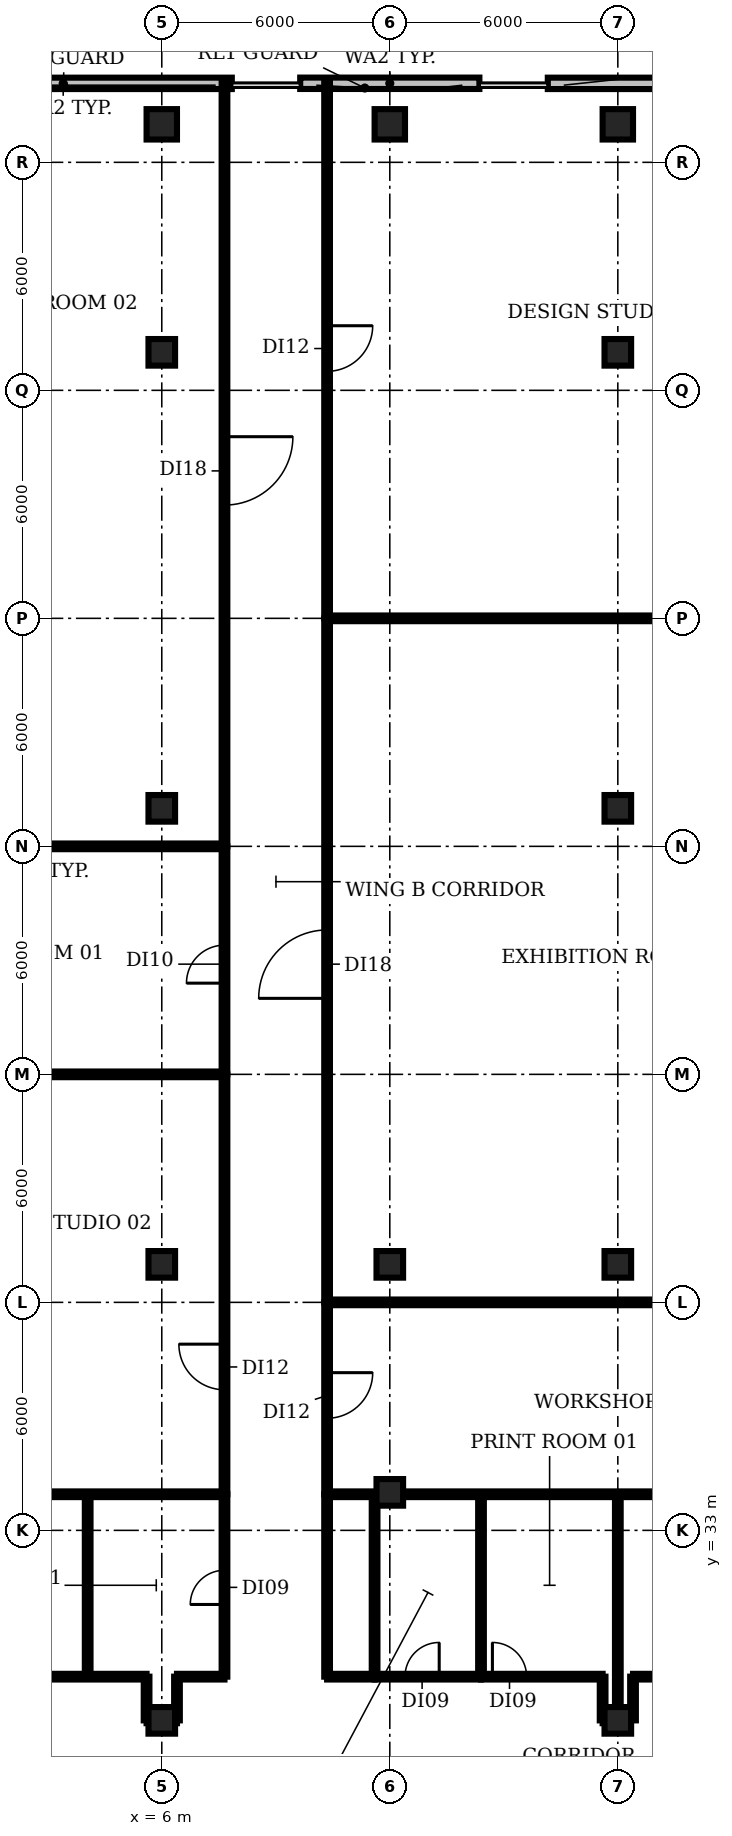
"""IFC4 building model, lengths in metres.
Left out: names, types, materials, properties, quantities, classifications, styles, units other than length and angle.
Written with IfcOpenShell. Run it as: python <this file> out.ifc"""

import sys

from ifc_helpers import new_model, si_unit, direction, frame, frame_2d, origin, origin_2d, place, context, subcontext, project, spatial, rectangle, extrude, element, fill, save


model = new_model("IFC4")
c1 = context("Model", 3, precision=1e-05, world=origin(), true_north=direction((0.0, 1.0)))
c2 = subcontext(c1, "Body", "Model", "MODEL_VIEW")
j1 = project(units=[si_unit("LENGTHUNIT", "METRE"), si_unit("PLANEANGLEUNIT", "RADIAN")], contexts=[c1])
p1 = place(None, origin())
s1 = spatial("IfcSite", under=j1, at=p1, CompositionType="ELEMENT")
p2 = place(p1, origin())
s2 = spatial("IfcBuilding", under=s1, at=p2, CompositionType="ELEMENT")
p3 = place(p2, frame((0.0, 0.0, 209.6)))
s3 = spatial("IfcBuildingStorey", under=s2, at=p3, CompositionType="ELEMENT", Elevation=209.6)
for number, where, z_axis, x_axis in (
    (1, (6.0, 28.0, 0.0), (0.0, 0.0, 1.0), (1.0, 0.0, 0.0)),
    (2, (6.0, 40.0, 0.0), (0.0, 0.0, 1.0), (1.0, 0.0, 0.0)),
    (3, (6.0, 52.0, 0.0), (0.0, 0.0, 1.0), (1.0, 0.0, 0.0)),
    (4, (6.0, 64.0, 0.0), (0.0, 0.0, 1.0), (1.0, 0.0, 0.0)),
):
    element("IfcColumn", number, at=place(p3, frame(where, z_axis=z_axis, x_axis=x_axis)), inside=s3, PredefinedType="COLUMN", context=c2, shape_type="SweptSolid", body=[
        extrude(rectangle(XDim=0.7, YDim=0.7, at=origin_2d()), origin(), (0.0, 0.0, 1.0), 3.8),
    ])
p4 = place(p3, frame((6.0, 70.0, 0.0), z_axis=(0.0, 0.0, 1.0), x_axis=(1.0, 0.0, 0.0)))
e5 = element("IfcColumn", 5, at=p4, inside=s3, PredefinedType="COLUMN", context=c2, shape_type="SweptSolid", body=[
    extrude(rectangle(XDim=0.8, YDim=0.8, at=origin_2d()), origin(), (0.0, 0.0, 1.0), 3.8),
])
for number, where, z_axis, x_axis in (
    (6, (12.0, 34.0, 0.0), (0.0, 0.0, 1.0), (1.0, 0.0, 0.0)),
    (7, (12.0, 40.0, 0.0), (0.0, 0.0, 1.0), (1.0, 0.0, 0.0)),
):
    element("IfcColumn", number, at=place(p3, frame(where, z_axis=z_axis, x_axis=x_axis)), inside=s3, PredefinedType="COLUMN", context=c2, shape_type="SweptSolid", body=[
        extrude(rectangle(XDim=0.7, YDim=0.7, at=origin_2d()), origin(), (0.0, 0.0, 1.0), 3.8),
    ])
p5 = place(p3, frame((12.0, 70.0, 0.0), z_axis=(0.0, 0.0, 1.0), x_axis=(1.0, 0.0, 0.0)))
e8 = element("IfcColumn", 8, at=p5, inside=s3, PredefinedType="COLUMN", context=c2, shape_type="SweptSolid", body=[
    extrude(rectangle(XDim=0.8, YDim=0.8, at=origin_2d()), origin(), (0.0, 0.0, 1.0), 3.8),
])
for number, where, z_axis, x_axis in (
    (9, (18.0, 28.0, 0.0), (0.0, 0.0, 1.0), (1.0, 0.0, 0.0)),
    (10, (18.0, 40.0, 0.0), (0.0, 0.0, 1.0), (1.0, 0.0, 0.0)),
    (11, (18.0, 52.0, 0.0), (0.0, 0.0, 1.0), (1.0, 0.0, 0.0)),
    (12, (18.0, 64.0, 0.0), (0.0, 0.0, 1.0), (1.0, 0.0, 0.0)),
):
    element("IfcColumn", number, at=place(p3, frame(where, z_axis=z_axis, x_axis=x_axis)), inside=s3, PredefinedType="COLUMN", context=c2, shape_type="SweptSolid", body=[
        extrude(rectangle(XDim=0.7, YDim=0.7, at=origin_2d()), origin(), (0.0, 0.0, 1.0), 3.8),
    ])
p6 = place(p3, frame((18.0, 70.0, 0.0), z_axis=(0.0, 0.0, 1.0), x_axis=(1.0, 0.0, 0.0)))
e13 = element("IfcColumn", 13, at=p6, inside=s3, PredefinedType="COLUMN", context=c2, shape_type="SweptSolid", body=[
    extrude(rectangle(XDim=0.8, YDim=0.8, at=origin_2d()), origin(), (0.0, 0.0, 1.0), 3.8),
])
p7 = place(p3, frame((25.03, 71.078, 0.0), z_axis=(0.0, 0.0, 1.0), x_axis=(-1.0, 0.0, 0.0)))
e14 = element("IfcWall", 14, at=p7, inside=s3, PredefinedType="SOLIDWALL", context=c2, shape_type="SweptSolid", body=[
    extrude(rectangle(XDim=8.873, YDim=0.3, at=frame_2d((4.436, 0.0))), origin(), (0.0, 0.0, 1.0), 3.8),
])
p8 = place(p3, frame((14.357, 71.08, 0.0), z_axis=(0.0, 0.0, 1.0), x_axis=(-1.0, 0.0, 0.0)))
e15 = element("IfcWall", 15, at=p8, inside=s3, PredefinedType="SOLIDWALL", context=c2, shape_type="SweptSolid", body=[
    extrude(rectangle(XDim=4.715, YDim=0.3, at=frame_2d((2.357, 0.0))), origin(), (0.0, 0.0, 1.0), 3.8),
])
p9 = place(p3, frame((7.843, 71.078, 0.0), z_axis=(0.0, 0.0, 1.0), x_axis=(-1.0, 0.0, 0.0)))
e16 = element("IfcWall", 16, at=p9, inside=s3, PredefinedType="SOLIDWALL", context=c2, shape_type="SweptSolid", body=[
    extrude(rectangle(XDim=8.873, YDim=0.3, at=frame_2d((4.436, 0.0))), origin(), (0.0, 0.0, 1.0), 3.8),
])
p10 = place(p3, frame((-2.18, 51.0, 0.0), z_axis=(0.0, 0.0, 1.0), x_axis=(1.0, 0.0, 0.0)))
e17 = element("IfcWall", 17, at=p10, inside=s3, PredefinedType="PARTITIONING", context=c2, shape_type="SweptSolid", body=[
    extrude(rectangle(XDim=9.83, YDim=0.15, at=frame_2d((4.915, 0.0))), origin(), (0.0, 0.0, 1.0), 2.83),
])
p11 = place(p3, frame((-1.7, 45.0, 0.0), z_axis=(0.0, 0.0, 1.0), x_axis=(1.0, 0.0, 0.0)))
e18 = element("IfcWall", 18, at=p11, inside=s3, PredefinedType="PARTITIONING", context=c2, shape_type="SweptSolid", body=[
    extrude(rectangle(XDim=9.35, YDim=0.15, at=frame_2d((4.675, 0.0))), origin(), (0.0, 0.0, 1.0), 2.83),
])
p12 = place(p3, frame((-0.98, 33.95, 0.0), z_axis=(0.0, 0.0, 1.0), x_axis=(1.0, 0.0, 0.0)))
e19 = element("IfcWall", 19, at=p12, inside=s3, PredefinedType="PARTITIONING", context=c2, shape_type="SweptSolid", body=[
    extrude(rectangle(XDim=8.63, YDim=0.15, at=frame_2d((4.315, 0.0))), origin(), (0.0, 0.0, 1.0), 2.83),
])
p13 = place(p3, frame((2.85, 29.15, 0.0), z_axis=(0.0, 0.0, 1.0), x_axis=(1.0, 0.0, 0.0)))
e20 = element("IfcWall", 20, at=p13, inside=s3, PredefinedType="PARTITIONING", context=c2, shape_type="SweptSolid", body=[
    extrude(rectangle(XDim=2.75, YDim=0.15, at=frame_2d((1.375, 0.0))), origin(), (0.0, 0.0, 1.0), 2.83),
])
p14 = place(p3, frame((4.05, 29.15, 0.0), z_axis=(0.0, 0.0, 1.0), x_axis=(0.0, 1.0, 0.0)))
e21 = element("IfcWall", 21, at=p14, inside=s3, PredefinedType="PARTITIONING", context=c2, shape_type="SweptSolid", body=[
    extrude(rectangle(XDim=4.8, YDim=0.15, at=frame_2d((2.4, 0.0))), origin(), (0.0, 0.0, 1.0), 2.83),
])
p15 = place(p3, frame((5.6, 28.0, 0.0), z_axis=(0.0, 0.0, 1.0), x_axis=(0.0, 1.0, 0.0)))
e22 = element("IfcWall", 22, at=p15, inside=s3, PredefinedType="PARTITIONING", context=c2, shape_type="SweptSolid", body=[
    extrude(rectangle(XDim=1.15, YDim=0.15, at=frame_2d((0.575, 0.0))), origin(), (0.0, 0.0, 1.0), 2.83),
])
p16 = place(p3, frame((5.6, 28.0, 0.0), z_axis=(0.0, 0.0, 1.0), x_axis=(1.0, 0.0, 0.0)))
e23 = element("IfcWall", 23, at=p16, inside=s3, PredefinedType="PARTITIONING", context=c2, shape_type="SweptSolid", body=[
    extrude(rectangle(XDim=0.8, YDim=0.15, at=frame_2d((0.4, 0.0))), origin(), (0.0, 0.0, 1.0), 2.83),
])
p17 = place(p3, frame((6.4, 28.0, 0.0), z_axis=(0.0, 0.0, 1.0), x_axis=(0.0, 1.0, 0.0)))
e24 = element("IfcWall", 24, at=p17, inside=s3, PredefinedType="PARTITIONING", context=c2, shape_type="SweptSolid", body=[
    extrude(rectangle(XDim=1.15, YDim=0.15, at=frame_2d((0.575, 0.0))), origin(), (0.0, 0.0, 1.0), 2.83),
])
p18 = place(p3, frame((6.4, 29.15, 0.0), z_axis=(0.0, 0.0, 1.0), x_axis=(1.0, 0.0, 0.0)))
e25 = element("IfcWall", 25, at=p18, inside=s3, PredefinedType="PARTITIONING", context=c2, shape_type="SweptSolid", body=[
    extrude(rectangle(XDim=1.25, YDim=0.15, at=frame_2d((0.625, 0.0))), origin(), (0.0, 0.0, 1.0), 2.83),
])
p19 = place(p3, frame((7.65, 29.15, 0.0), z_axis=(0.0, 0.0, 1.0), x_axis=(0.0, 1.0, 0.0)))
e26 = element("IfcWall", 26, at=p19, inside=s3, PredefinedType="PARTITIONING", context=c2, shape_type="SweptSolid", body=[
    extrude(rectangle(XDim=4.8, YDim=0.15, at=frame_2d((2.4, 0.0))), origin(), (0.0, 0.0, 1.0), 2.83),
])
p20 = place(p19, frame((1.9, 0.0, 0.0)))
e27 = element("IfcOpeningElement", 27, at=p20, cuts=e26, PredefinedType="OPENING", context=c2, shape_type="SweptSolid", body=[
    extrude(rectangle(XDim=0.9, YDim=2.1, at=frame_2d((0.45, 1.05))), frame((0.0, 0.085, 0.0), z_axis=(0.0, -1.0, 0.0), x_axis=(1.0, 0.0, 0.0)), (0.0, 0.0, 1.0), 0.17),
])
p21 = place(p3, frame((7.65, 33.95, 0.0), z_axis=(0.0, 0.0, 1.0), x_axis=(0.0, 1.0, 0.0)))
e28 = element("IfcWall", 28, at=p21, inside=s3, PredefinedType="PARTITIONING", context=c2, shape_type="SweptSolid", body=[
    extrude(rectangle(XDim=11.05, YDim=0.15, at=frame_2d((5.525, 0.0))), origin(), (0.0, 0.0, 1.0), 2.83),
])
p22 = place(p21, frame((2.75, 0.0, 0.0)))
e29 = element("IfcOpeningElement", 29, at=p22, cuts=e28, PredefinedType="OPENING", context=c2, shape_type="SweptSolid", body=[
    extrude(rectangle(XDim=1.2, YDim=2.1, at=frame_2d((0.6, 1.05))), frame((0.0, 0.085, 0.0), z_axis=(0.0, -1.0, 0.0), x_axis=(1.0, 0.0, 0.0)), (0.0, 0.0, 1.0), 0.17),
])
p23 = place(p3, frame((7.65, 45.0, 0.0), z_axis=(0.0, 0.0, 1.0), x_axis=(0.0, 1.0, 0.0)))
e30 = element("IfcWall", 30, at=p23, inside=s3, PredefinedType="PARTITIONING", context=c2, shape_type="SweptSolid", body=[
    extrude(rectangle(XDim=6.0, YDim=0.15, at=frame_2d((3.0, 0.0))), origin(), (0.0, 0.0, 1.0), 2.83),
])
p24 = place(p23, frame((2.4, 0.0, 0.0)))
e31 = element("IfcOpeningElement", 31, at=p24, cuts=e30, PredefinedType="OPENING", context=c2, shape_type="SweptSolid", body=[
    extrude(rectangle(XDim=1.0, YDim=2.1, at=frame_2d((0.5, 1.05))), frame((0.0, 0.085, 0.0), z_axis=(0.0, -1.0, 0.0), x_axis=(1.0, 0.0, 0.0)), (0.0, 0.0, 1.0), 0.17),
])
p25 = place(p3, frame((7.65, 71.09, 0.0), z_axis=(0.0, 0.0, 1.0), x_axis=(0.0, -1.0, 0.0)))
e32 = element("IfcWall", 32, at=p25, inside=s3, PredefinedType="PARTITIONING", context=c2, shape_type="SweptSolid", body=[
    extrude(rectangle(XDim=20.09, YDim=0.15, at=frame_2d((10.045, 0.0))), origin(), (0.0, 0.0, 1.0), 2.83),
])
p26 = place(p25, frame((9.31, 0.0, 0.0)))
e33 = element("IfcOpeningElement", 33, at=p26, cuts=e32, PredefinedType="OPENING", context=c2, shape_type="SweptSolid", body=[
    extrude(rectangle(XDim=1.8, YDim=2.1, at=frame_2d((0.9, 1.05))), frame((0.0, 0.085, 0.0), z_axis=(0.0, -1.0, 0.0), x_axis=(1.0, 0.0, 0.0)), (0.0, 0.0, 1.0), 0.17),
])
p27 = place(p3, frame((10.35, 29.15, 0.0), z_axis=(0.0, 0.0, 1.0), x_axis=(0.0, 1.0, 0.0)))
e34 = element("IfcWall", 34, at=p27, inside=s3, PredefinedType="PARTITIONING", context=c2, shape_type="SweptSolid", body=[
    extrude(rectangle(XDim=4.8, YDim=0.15, at=frame_2d((2.4, 0.0))), origin(), (0.0, 0.0, 1.0), 2.83),
])
p28 = place(p3, frame((10.35, 29.15, 0.0), z_axis=(0.0, 0.0, 1.0), x_axis=(1.0, 0.0, 0.0)))
e35 = element("IfcWall", 35, at=p28, inside=s3, PredefinedType="PARTITIONING", context=c2, shape_type="SweptSolid", body=[
    extrude(rectangle(XDim=1.25, YDim=0.15, at=frame_2d((0.625, 0.0))), origin(), (0.0, 0.0, 1.0), 2.83),
])
p29 = place(p3, frame((10.35, 33.95, 0.0), z_axis=(0.0, 0.0, 1.0), x_axis=(1.0, 0.0, 0.0)))
e36 = element("IfcWall", 36, at=p29, inside=s3, PredefinedType="PARTITIONING", context=c2, shape_type="SweptSolid", body=[
    extrude(rectangle(XDim=1.242, YDim=0.15, at=frame_2d((0.621, 0.0))), origin(), (0.0, 0.0, 1.0), 2.83),
])
p30 = place(p3, frame((10.35, 39.0, 0.0), z_axis=(0.0, 0.0, 1.0), x_axis=(0.0, -1.0, 0.0)))
e37 = element("IfcWall", 37, at=p30, inside=s3, PredefinedType="PARTITIONING", context=c2, shape_type="SweptSolid", body=[
    extrude(rectangle(XDim=5.05, YDim=0.15, at=frame_2d((2.525, 0.0))), origin(), (0.0, 0.0, 1.0), 2.83),
])
p31 = place(p30, frame((1.85, 0.0, 0.0)))
e38 = element("IfcOpeningElement", 38, at=p31, cuts=e37, PredefinedType="OPENING", context=c2, shape_type="SweptSolid", body=[
    extrude(rectangle(XDim=1.2, YDim=2.1, at=frame_2d((0.6, 1.05))), frame((0.0, 0.085, 0.0), z_axis=(0.0, -1.0, 0.0), x_axis=(1.0, 0.0, 0.0)), (0.0, 0.0, 1.0), 0.17),
])
p32 = place(p3, frame((10.35, 39.0, 0.0), z_axis=(0.0, 0.0, 1.0), x_axis=(0.0, 1.0, 0.0)))
e39 = element("IfcWall", 39, at=p32, inside=s3, PredefinedType="PARTITIONING", context=c2, shape_type="SweptSolid", body=[
    extrude(rectangle(XDim=18.0, YDim=0.15, at=frame_2d((9.0, 0.0))), origin(), (0.0, 0.0, 1.0), 2.83),
])
p33 = place(p32, frame((8.0, 0.0, 0.0)))
e40 = element("IfcOpeningElement", 40, at=p33, cuts=e39, PredefinedType="OPENING", context=c2, shape_type="SweptSolid", body=[
    extrude(rectangle(XDim=1.8, YDim=2.1, at=frame_2d((0.9, 1.05))), frame((0.0, 0.085, 0.0), z_axis=(0.0, -1.0, 0.0), x_axis=(1.0, 0.0, 0.0)), (0.0, 0.0, 1.0), 0.17),
])
for number, where, z_axis, x_axis in (
    (41, (10.35, 39.0, 0.0), (0.0, 0.0, 1.0), (1.0, 0.0, 0.0)),
    (42, (10.35, 57.0, 0.0), (0.0, 0.0, 1.0), (1.0, 0.0, 0.0)),
):
    element("IfcWall", number, at=place(p3, frame(where, z_axis=z_axis, x_axis=x_axis)), inside=s3, PredefinedType="PARTITIONING", context=c2, shape_type="SweptSolid", body=[
        extrude(rectangle(XDim=14.63, YDim=0.15, at=frame_2d((7.315, 0.0))), origin(), (0.0, 0.0, 1.0), 2.83),
    ])
p34 = place(p3, frame((10.35, 71.09, 0.0), z_axis=(0.0, 0.0, 1.0), x_axis=(0.0, -1.0, 0.0)))
e43 = element("IfcWall", 43, at=p34, inside=s3, PredefinedType="PARTITIONING", context=c2, shape_type="SweptSolid", body=[
    extrude(rectangle(XDim=14.09, YDim=0.15, at=frame_2d((7.045, 0.0))), origin(), (0.0, 0.0, 1.0), 2.83),
])
p35 = place(p34, frame((6.39, 0.0, 0.0)))
e44 = element("IfcOpeningElement", 44, at=p35, cuts=e43, PredefinedType="OPENING", context=c2, shape_type="SweptSolid", body=[
    extrude(rectangle(XDim=1.2, YDim=2.1, at=frame_2d((0.6, 1.05))), frame((0.0, 0.085, 0.0), z_axis=(0.0, -1.0, 0.0), x_axis=(1.0, 0.0, 0.0)), (0.0, 0.0, 1.0), 0.17),
])
p36 = place(p3, frame((11.6, 29.15, 0.0), z_axis=(0.0, 0.0, 1.0), x_axis=(0.0, 1.0, 0.0)))
e45 = element("IfcWall", 45, at=p36, inside=s3, PredefinedType="PARTITIONING", context=c2, shape_type="SweptSolid", body=[
    extrude(rectangle(XDim=4.72, YDim=0.15, at=frame_2d((2.36, 0.0))), origin(), (0.0, 0.0, 1.0), 2.83),
])
p37 = place(p3, frame((11.6, 29.15, 0.0), z_axis=(0.0, 0.0, 1.0), x_axis=(1.0, 0.0, 0.0)))
e46 = element("IfcWall", 46, at=p37, inside=s3, PredefinedType="PARTITIONING", context=c2, shape_type="SweptSolid", body=[
    extrude(rectangle(XDim=2.8, YDim=0.15, at=frame_2d((1.4, 0.0))), origin(), (0.0, 0.0, 1.0), 2.83),
])
p38 = place(p37, frame((0.8, 0.0, 0.0)))
e47 = element("IfcOpeningElement", 47, at=p38, cuts=e46, PredefinedType="OPENING", context=c2, shape_type="SweptSolid", body=[
    extrude(rectangle(XDim=0.9, YDim=2.1, at=frame_2d((0.45, 1.05))), frame((0.0, 0.085, 0.0), z_axis=(0.0, -1.0, 0.0), x_axis=(1.0, 0.0, 0.0)), (0.0, 0.0, 1.0), 0.17),
])
p39 = place(p3, frame((11.696, 33.95, 0.0), z_axis=(0.0, 0.0, 1.0), x_axis=(1.0, 0.0, 0.0)))
e48 = element("IfcWall", 48, at=p39, inside=s3, PredefinedType="PARTITIONING", context=c2, shape_type="SweptSolid", body=[
    extrude(rectangle(XDim=0.621, YDim=0.15, at=frame_2d((0.311, 0.0))), origin(), (0.0, 0.0, 1.0), 2.83),
])
p40 = place(p3, frame((12.42, 33.95, 0.0), z_axis=(0.0, 0.0, 1.0), x_axis=(1.0, 0.0, 0.0)))
e49 = element("IfcWall", 49, at=p40, inside=s3, PredefinedType="PARTITIONING", context=c2, shape_type="SweptSolid", body=[
    extrude(rectangle(XDim=9.72, YDim=0.15, at=frame_2d((4.86, 0.0))), origin(), (0.0, 0.0, 1.0), 2.83),
])
p41 = place(p3, frame((14.4, 29.15, 0.0), z_axis=(0.0, 0.0, 1.0), x_axis=(0.0, 1.0, 0.0)))
e50 = element("IfcWall", 50, at=p41, inside=s3, PredefinedType="PARTITIONING", context=c2, shape_type="SweptSolid", body=[
    extrude(rectangle(XDim=4.8, YDim=0.15, at=frame_2d((2.4, 0.0))), origin(), (0.0, 0.0, 1.0), 2.83),
])
p42 = place(p3, frame((14.4, 29.15, 0.0), z_axis=(0.0, 0.0, 1.0), x_axis=(1.0, 0.0, 0.0)))
e51 = element("IfcWall", 51, at=p42, inside=s3, PredefinedType="PARTITIONING", context=c2, shape_type="SweptSolid", body=[
    extrude(rectangle(XDim=3.2, YDim=0.15, at=frame_2d((1.6, 0.0))), origin(), (0.0, 0.0, 1.0), 2.83),
])
p43 = place(p42, frame((0.3, 0.0, 0.0)))
e52 = element("IfcOpeningElement", 52, at=p43, cuts=e51, PredefinedType="OPENING", context=c2, shape_type="SweptSolid", body=[
    extrude(rectangle(XDim=0.9, YDim=2.1, at=frame_2d((0.45, 1.05))), frame((0.0, 0.085, 0.0), z_axis=(0.0, -1.0, 0.0), x_axis=(1.0, 0.0, 0.0)), (0.0, 0.0, 1.0), 0.17),
])
p44 = place(p3, frame((17.6, 28.0, 0.0), z_axis=(0.0, 0.0, 1.0), x_axis=(0.0, 1.0, 0.0)))
e53 = element("IfcWall", 53, at=p44, inside=s3, PredefinedType="PARTITIONING", context=c2, shape_type="SweptSolid", body=[
    extrude(rectangle(XDim=1.15, YDim=0.15, at=frame_2d((0.575, 0.0))), origin(), (0.0, 0.0, 1.0), 2.83),
])
p45 = place(p3, frame((17.6, 28.0, 0.0), z_axis=(0.0, 0.0, 1.0), x_axis=(1.0, 0.0, 0.0)))
e54 = element("IfcWall", 54, at=p45, inside=s3, PredefinedType="PARTITIONING", context=c2, shape_type="SweptSolid", body=[
    extrude(rectangle(XDim=0.4, YDim=0.15, at=frame_2d((0.2, 0.0))), origin(), (0.0, 0.0, 1.0), 2.83),
])
p46 = place(p3, frame((18.0, 28.0, 0.0), z_axis=(0.0, 0.0, 1.0), x_axis=(0.0, 1.0, 0.0)))
e55 = element("IfcWall", 55, at=p46, inside=s3, PredefinedType="PARTITIONING", context=c2, shape_type="SweptSolid", body=[
    extrude(rectangle(XDim=5.95, YDim=0.15, at=frame_2d((2.975, 0.0))), origin(), (0.0, 0.0, 1.0), 2.83),
])
p47 = place(p3, frame((18.4, 28.0, 0.0), z_axis=(0.0, 0.0, 1.0), x_axis=(0.0, 1.0, 0.0)))
e56 = element("IfcWall", 56, at=p47, inside=s3, PredefinedType="PARTITIONING", context=c2, shape_type="SweptSolid", body=[
    extrude(rectangle(XDim=1.15, YDim=0.15, at=frame_2d((0.575, 0.0))), origin(), (0.0, 0.0, 1.0), 2.83),
])
p48 = place(p3, frame((18.4, 29.15, 0.0), z_axis=(0.0, 0.0, 1.0), x_axis=(1.0, 0.0, 0.0)))
e57 = element("IfcWall", 57, at=p48, inside=s3, PredefinedType="PARTITIONING", context=c2, shape_type="SweptSolid", body=[
    extrude(rectangle(XDim=3.74, YDim=0.15, at=frame_2d((1.87, 0.0))), origin(), (0.0, 0.0, 1.0), 2.83),
])
p49 = place(p20, origin())
e58 = element("IfcDoor", 58, at=p49, inside=s3, OperationType="SINGLE_SWING_LEFT", PredefinedType="DOOR", context=c2, shape_type="SweptSolid", body=[
    extrude(rectangle(XDim=0.9, YDim=2.1, at=frame_2d((0.45, 1.05))), frame((0.0, 0.025, 0.0), z_axis=(0.0, -1.0, 0.0), x_axis=(1.0, 0.0, 0.0)), (0.0, 0.0, 1.0), 0.05),
])
fill(e27, e58)
p50 = place(p22, origin())
e59 = element("IfcDoor", 59, at=p50, inside=s3, OperationType="SINGLE_SWING_RIGHT", PredefinedType="DOOR", context=c2, shape_type="SweptSolid", body=[
    extrude(rectangle(XDim=1.2, YDim=2.1, at=frame_2d((0.6, 1.05))), frame((0.0, 0.025, 0.0), z_axis=(0.0, -1.0, 0.0), x_axis=(1.0, 0.0, 0.0)), (0.0, 0.0, 1.0), 0.05),
])
fill(e29, e59)
p51 = place(p24, origin())
e60 = element("IfcDoor", 60, at=p51, inside=s3, OperationType="SINGLE_SWING_LEFT", PredefinedType="DOOR", context=c2, shape_type="SweptSolid", body=[
    extrude(rectangle(XDim=1.0, YDim=2.1, at=frame_2d((0.5, 1.05))), frame((0.0, 0.025, 0.0), z_axis=(0.0, -1.0, 0.0), x_axis=(1.0, 0.0, 0.0)), (0.0, 0.0, 1.0), 0.05),
])
fill(e31, e60)
p52 = place(p26, origin())
e61 = element("IfcDoor", 61, at=p52, inside=s3, OperationType="SINGLE_SWING_LEFT", PredefinedType="DOOR", context=c2, shape_type="SweptSolid", body=[
    extrude(rectangle(XDim=1.8, YDim=2.1, at=frame_2d((0.9, 1.05))), frame((0.0, 0.025, 0.0), z_axis=(0.0, -1.0, 0.0), x_axis=(1.0, 0.0, 0.0)), (0.0, 0.0, 1.0), 0.05),
])
fill(e33, e61)
p53 = place(p31, origin())
e62 = element("IfcDoor", 62, at=p53, inside=s3, OperationType="SINGLE_SWING_LEFT", PredefinedType="DOOR", context=c2, shape_type="SweptSolid", body=[
    extrude(rectangle(XDim=1.2, YDim=2.1, at=frame_2d((0.6, 1.05))), frame((0.0, 0.025, 0.0), z_axis=(0.0, -1.0, 0.0), x_axis=(1.0, 0.0, 0.0)), (0.0, 0.0, 1.0), 0.05),
])
fill(e38, e62)
p54 = place(p33, origin())
e63 = element("IfcDoor", 63, at=p54, inside=s3, OperationType="SINGLE_SWING_LEFT", PredefinedType="DOOR", context=c2, shape_type="SweptSolid", body=[
    extrude(rectangle(XDim=1.8, YDim=2.1, at=frame_2d((0.9, 1.05))), frame((0.0, 0.025, 0.0), z_axis=(0.0, -1.0, 0.0), x_axis=(1.0, 0.0, 0.0)), (0.0, 0.0, 1.0), 0.05),
])
fill(e40, e63)
p55 = place(p35, origin())
e64 = element("IfcDoor", 64, at=p55, inside=s3, OperationType="SINGLE_SWING_LEFT", PredefinedType="DOOR", context=c2, shape_type="SweptSolid", body=[
    extrude(rectangle(XDim=1.2, YDim=2.1, at=frame_2d((0.6, 1.05))), frame((0.0, 0.025, 0.0), z_axis=(0.0, -1.0, 0.0), x_axis=(1.0, 0.0, 0.0)), (0.0, 0.0, 1.0), 0.05),
])
fill(e44, e64)
p56 = place(p38, origin())
e65 = element("IfcDoor", 65, at=p56, inside=s3, OperationType="SINGLE_SWING_RIGHT", PredefinedType="DOOR", context=c2, shape_type="SweptSolid", body=[
    extrude(rectangle(XDim=0.9, YDim=2.1, at=frame_2d((0.45, 1.05))), frame((0.0, 0.025, 0.0), z_axis=(0.0, -1.0, 0.0), x_axis=(1.0, 0.0, 0.0)), (0.0, 0.0, 1.0), 0.05),
])
fill(e47, e65)
p57 = place(p43, origin())
e66 = element("IfcDoor", 66, at=p57, inside=s3, OperationType="SINGLE_SWING_LEFT", PredefinedType="DOOR", context=c2, shape_type="SweptSolid", body=[
    extrude(rectangle(XDim=0.9, YDim=2.1, at=frame_2d((0.45, 1.05))), frame((0.0, 0.025, 0.0), z_axis=(0.0, -1.0, 0.0), x_axis=(1.0, 0.0, 0.0)), (0.0, 0.0, 1.0), 0.05),
])
fill(e52, e66)
save(model, sys.argv[1])
